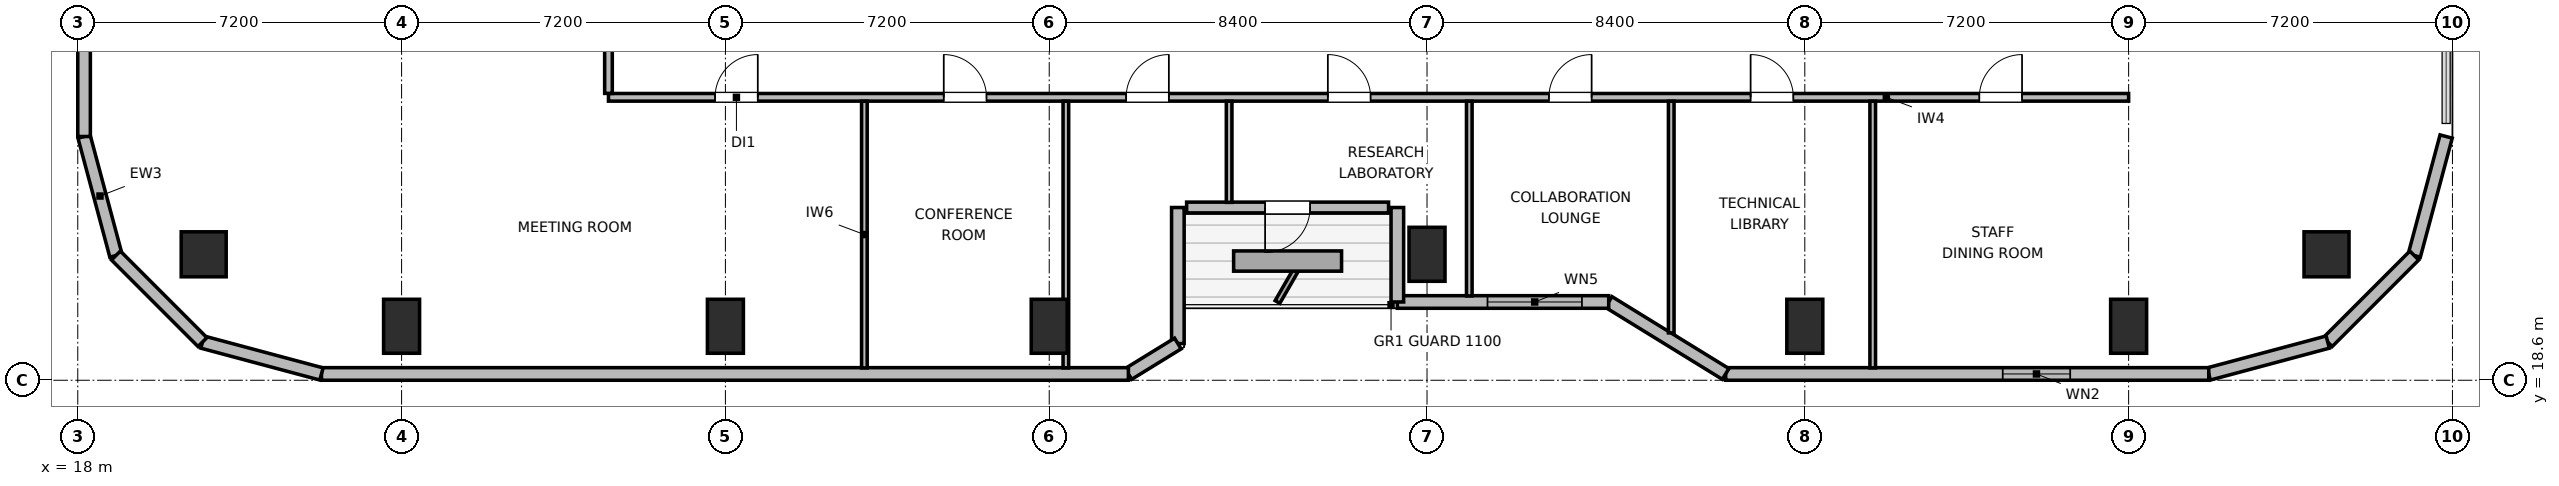
"""IFC4 building model, lengths in metres.
Left out: names, types, materials, properties, quantities, classifications, styles, units other than length and angle.
Written with IfcOpenShell. Run it as: python <this file> out.ifc"""

import sys

from ifc_helpers import new_model, si_unit, direction, frame, frame_2d, origin, origin_2d, place, context, subcontext, project, spatial, rectangle, circle, extrude, element, fill, save


model = new_model("IFC4")
c1 = context("Model", 3, precision=1e-05, world=origin(), true_north=direction((0.0, 1.0)))
c2 = subcontext(c1, "Body", "Model", "MODEL_VIEW")
j1 = project(units=[si_unit("LENGTHUNIT", "METRE"), si_unit("PLANEANGLEUNIT", "RADIAN")], contexts=[c1])
p1 = place(None, origin())
s1 = spatial("IfcSite", under=j1, at=p1, CompositionType="ELEMENT")
p2 = place(p1, origin())
s2 = spatial("IfcBuilding", under=s1, at=p2, CompositionType="ELEMENT")
p3 = place(p2, frame((0.0, 0.0, 170.1)))
s3 = spatial("IfcBuildingStorey", under=s2, at=p3, CompositionType="ELEMENT", Elevation=170.1)
for number, where, z_axis, x_axis in (
    (1, (20.8, 21.4, 0.0), (0.0, 0.0, 1.0), (1.0, 0.0, 0.0)),
    (2, (68.0, 21.4, 0.0), (0.0, 0.0, 1.0), (1.0, 0.0, 0.0)),
):
    element("IfcColumn", number, at=place(p3, frame(where, z_axis=z_axis, x_axis=x_axis)), inside=s3, PredefinedType="COLUMN", context=c2, shape_type="SweptSolid", body=[
        extrude(circle(Radius=0.5, at=origin_2d()), origin(), (0.0, 0.0, 1.0), 3.9),
    ])
for number, where, z_axis, x_axis in (
    (3, (25.2, 19.8, 0.0), (0.0, 0.0, 1.0), (1.0, 0.0, 0.0)),
    (4, (32.4, 19.8, 0.0), (0.0, 0.0, 1.0), (1.0, 0.0, 0.0)),
    (5, (39.6, 19.8, 0.0), (0.0, 0.0, 1.0), (1.0, 0.0, 0.0)),
    (6, (48.0, 21.4, 0.0), (0.0, 0.0, 1.0), (1.0, 0.0, 0.0)),
    (7, (56.4, 19.8, 0.0), (0.0, 0.0, 1.0), (1.0, 0.0, 0.0)),
    (8, (63.6, 19.8, 0.0), (0.0, 0.0, 1.0), (1.0, 0.0, 0.0)),
):
    element("IfcColumn", number, at=place(p3, frame(where, z_axis=z_axis, x_axis=x_axis)), inside=s3, PredefinedType="COLUMN", context=c2, shape_type="SweptSolid", body=[
        extrude(rectangle(XDim=0.8, YDim=1.2, at=origin_2d()), origin(), (0.0, 0.0, 1.0), 3.9),
    ])
p4 = place(p3, frame((18.848, 21.373, 0.0), z_axis=(0.0, 0.0, 1.0), x_axis=(-0.258672222976, 0.9659651552, 0.0)))
e9 = element("IfcWall", 9, at=p4, inside=s3, PredefinedType="SOLIDWALL", context=c2, shape_type="SweptSolid", body=[
    extrude(rectangle(XDim=2.739, YDim=0.28, at=frame_2d((1.37, 0.0))), origin(), (0.0, 0.0, 1.0), 3.68),
])
p5 = place(p3, frame((18.14, 24.018, 0.0), z_axis=(0.0, 0.0, 1.0), x_axis=(0.0, 1.0, 0.0)))
e10 = element("IfcWall", 10, at=p5, inside=s3, PredefinedType="SOLIDWALL", context=c2, shape_type="SweptSolid", body=[
    extrude(rectangle(XDim=5.242, YDim=0.28, at=frame_2d((2.621, 0.0))), origin(), (0.0, 0.0, 1.0), 3.68),
])
p6 = place(p3, frame((70.66, 24.018, 0.0), z_axis=(0.0, 0.0, 1.0), x_axis=(-0.258672222976, -0.9659651552, 0.0)))
e11 = element("IfcWall", 11, at=p6, inside=s3, PredefinedType="SOLIDWALL", context=c2, shape_type="SweptSolid", body=[
    extrude(rectangle(XDim=2.739, YDim=0.28, at=frame_2d((1.37, 0.0))), origin(), (0.0, 0.0, 1.0), 3.68),
])
p7 = place(p3, frame((69.951, 21.373, 0.0), z_axis=(0.0, 0.0, 1.0), x_axis=(-0.707061915429, -0.707151644098, 0.0)))
e12 = element("IfcWall", 12, at=p7, inside=s3, PredefinedType="SOLIDWALL", context=c2, shape_type="SweptSolid", body=[
    extrude(rectangle(XDim=2.721, YDim=0.28, at=frame_2d((1.36, 0.0))), origin(), (0.0, 0.0, 1.0), 3.68),
])
p8 = place(p3, frame((68.028, 19.448, 0.0), z_axis=(0.0, 0.0, 1.0), x_axis=(-0.965971118627, -0.258649952598, 0.0)))
e13 = element("IfcWall", 13, at=p8, inside=s3, PredefinedType="SOLIDWALL", context=c2, shape_type="SweptSolid", body=[
    extrude(rectangle(XDim=2.739, YDim=0.28, at=frame_2d((1.37, 0.0))), origin(), (0.0, 0.0, 1.0), 3.68),
])
p9 = place(p3, frame((65.382, 18.74, 0.0), z_axis=(0.0, 0.0, 1.0), x_axis=(-1.0, 0.0, 0.0)))
e14 = element("IfcWall", 14, at=p9, inside=s3, PredefinedType="SOLIDWALL", context=c2, shape_type="SweptSolid", body=[
    extrude(rectangle(XDim=10.742, YDim=0.28, at=frame_2d((5.371, 0.0))), origin(), (0.0, 0.0, 1.0), 3.68),
])
p10 = place(p9, frame((3.081, 0.0, 0.85)))
e15 = element("IfcOpeningElement", 15, at=p10, cuts=e14, PredefinedType="OPENING", context=c2, shape_type="SweptSolid", body=[
    extrude(rectangle(XDim=1.5, YDim=1.1, at=frame_2d((0.75, 0.55))), frame((0.0, 0.15, 0.0), z_axis=(0.0, -1.0, 0.0), x_axis=(1.0, 0.0, 0.0)), (0.0, 0.0, 1.0), 0.3),
])
p11 = place(p3, frame((54.64, 18.74, 0.0), z_axis=(0.0, 0.0, 1.0), x_axis=(-0.851652825334, 0.524106349037, 0.0)))
e16 = element("IfcWall", 16, at=p11, inside=s3, PredefinedType="SOLIDWALL", context=c2, shape_type="SweptSolid", body=[
    extrude(rectangle(XDim=3.053, YDim=0.28, at=frame_2d((1.526, 0.0))), origin(), (0.0, 0.0, 1.0), 2.265),
])
p12 = place(p3, frame((52.04, 20.34, 0.0), z_axis=(0.0, 0.0, 1.0), x_axis=(-1.0, 0.0, 0.0)))
e17 = element("IfcWall", 17, at=p12, inside=s3, PredefinedType="SOLIDWALL", context=c2, shape_type="SweptSolid", body=[
    extrude(rectangle(XDim=4.699, YDim=0.28, at=frame_2d((2.35, 0.0))), origin(), (0.0, 0.0, 1.0), 2.265),
])
p13 = place(p12, frame((0.595, 0.0, 0.85)))
e18 = element("IfcOpeningElement", 18, at=p13, cuts=e17, PredefinedType="OPENING", context=c2, shape_type="SweptSolid", body=[
    extrude(rectangle(XDim=2.1, YDim=1.05, at=frame_2d((1.05, 0.525))), frame((0.0, 0.15, 0.0), z_axis=(0.0, -1.0, 0.0), x_axis=(1.0, 0.0, 0.0)), (0.0, 0.0, 1.0), 0.3),
])
p14 = place(p3, frame((47.34, 20.34, 0.0), z_axis=(0.0, 0.0, 1.0), x_axis=(0.0, 1.0, 0.0)))
e19 = element("IfcWall", 19, at=p14, inside=s3, PredefinedType="SOLIDWALL", context=c2, shape_type="SweptSolid", body=[
    extrude(rectangle(XDim=2.1, YDim=0.28, at=frame_2d((1.05, 0.0))), origin(), (0.0, 0.0, 1.0), 2.265),
])
p15 = place(p3, frame((47.145, 22.44, 0.0), z_axis=(0.0, 0.0, 1.0), x_axis=(-1.0, 0.0, 0.0)))
e20 = element("IfcWall", 20, at=p15, inside=s3, PredefinedType="SOLIDWALL", context=c2, shape_type="SweptSolid", body=[
    extrude(rectangle(XDim=4.49, YDim=0.24, at=frame_2d((2.245, 0.0))), origin(), (0.0, 0.0, 1.0), 3.68),
])
p16 = place(p15, frame((1.745, 0.0, 0.0)))
e21 = element("IfcOpeningElement", 21, at=p16, cuts=e20, PredefinedType="OPENING", context=c2, shape_type="SweptSolid", body=[
    extrude(rectangle(XDim=1.0, YDim=2.02, at=frame_2d((0.5, 1.01))), frame((0.0, 0.13, 0.0), z_axis=(0.0, -1.0, 0.0), x_axis=(1.0, 0.0, 0.0)), (0.0, 0.0, 1.0), 0.26),
])
p17 = place(p3, frame((42.46, 22.44, 0.0), z_axis=(0.0, 0.0, 1.0), x_axis=(0.0, -1.0, 0.0)))
e22 = element("IfcWall", 22, at=p17, inside=s3, PredefinedType="SOLIDWALL", context=c2, shape_type="SweptSolid", body=[
    extrude(rectangle(XDim=3.024, YDim=0.28, at=frame_2d((1.512, 0.0))), origin(), (0.0, 0.0, 1.0), 2.265),
])
p18 = place(p3, frame((42.46, 19.416, 0.0), z_axis=(0.0, 0.0, 1.0), x_axis=(-0.851801140441, -0.523865266212, 0.0)))
e23 = element("IfcWall", 23, at=p18, inside=s3, PredefinedType="SOLIDWALL", context=c2, shape_type="SweptSolid", body=[
    extrude(rectangle(XDim=1.291, YDim=0.28, at=frame_2d((0.646, 0.0))), origin(), (0.0, 0.0, 1.0), 3.68),
])
p19 = place(p3, frame((41.36, 18.74, 0.0), z_axis=(0.0, 0.0, 1.0), x_axis=(-1.0, 0.0, 0.0)))
e24 = element("IfcWall", 24, at=p19, inside=s3, PredefinedType="SOLIDWALL", context=c2, shape_type="SweptSolid", body=[
    extrude(rectangle(XDim=17.942, YDim=0.28, at=frame_2d((8.971, 0.0))), origin(), (0.0, 0.0, 1.0), 3.68),
])
p20 = place(p3, frame((23.418, 18.74, 0.0), z_axis=(0.0, 0.0, 1.0), x_axis=(-0.965971118627, 0.258649952598, 0.0)))
e25 = element("IfcWall", 25, at=p20, inside=s3, PredefinedType="SOLIDWALL", context=c2, shape_type="SweptSolid", body=[
    extrude(rectangle(XDim=2.739, YDim=0.28, at=frame_2d((1.37, 0.0))), origin(), (0.0, 0.0, 1.0), 3.68),
])
p21 = place(p3, frame((20.772, 19.448, 0.0), z_axis=(0.0, 0.0, 1.0), x_axis=(-0.707106781187, 0.707106781187, 0.0)))
e26 = element("IfcWall", 26, at=p21, inside=s3, PredefinedType="SOLIDWALL", context=c2, shape_type="SweptSolid", body=[
    extrude(rectangle(XDim=2.721, YDim=0.28, at=frame_2d((1.36, 0.0))), origin(), (0.0, 0.0, 1.0), 3.68),
])
p22 = place(p3, frame((29.8, 24.89, 0.0), z_axis=(0.0, 0.0, 1.0), x_axis=(1.0, 0.0, 0.0)))
e27 = element("IfcWall", 27, at=p22, inside=s3, PredefinedType="PARTITIONING", context=c2, shape_type="SweptSolid", body=[
    extrude(rectangle(XDim=33.8, YDim=0.17, at=frame_2d((16.9, 0.0))), origin(), (0.0, 0.0, 1.0), 3.68),
])
p23 = place(p22, frame((2.37, 0.0, 0.0)))
e28 = element("IfcOpeningElement", 28, at=p23, cuts=e27, PredefinedType="OPENING", context=c2, shape_type="SweptSolid", body=[
    extrude(rectangle(XDim=0.95, YDim=2.04, at=frame_2d((0.475, 1.02))), frame((0.0, 0.095, 0.0), z_axis=(0.0, -1.0, 0.0), x_axis=(1.0, 0.0, 0.0)), (0.0, 0.0, 1.0), 0.19),
])
p24 = place(p22, frame((7.455, 0.0, 0.0)))
e29 = element("IfcOpeningElement", 29, at=p24, cuts=e27, PredefinedType="OPENING", context=c2, shape_type="SweptSolid", body=[
    extrude(rectangle(XDim=0.95, YDim=2.04, at=frame_2d((0.475, 1.02))), frame((0.0, 0.095, 0.0), z_axis=(0.0, -1.0, 0.0), x_axis=(1.0, 0.0, 0.0)), (0.0, 0.0, 1.0), 0.19),
])
p25 = place(p22, frame((11.51, 0.0, 0.0)))
e30 = element("IfcOpeningElement", 30, at=p25, cuts=e27, PredefinedType="OPENING", context=c2, shape_type="SweptSolid", body=[
    extrude(rectangle(XDim=0.95, YDim=2.04, at=frame_2d((0.475, 1.02))), frame((0.0, 0.095, 0.0), z_axis=(0.0, -1.0, 0.0), x_axis=(1.0, 0.0, 0.0)), (0.0, 0.0, 1.0), 0.19),
])
p26 = place(p22, frame((15.995, 0.0, 0.0)))
e31 = element("IfcOpeningElement", 31, at=p26, cuts=e27, PredefinedType="OPENING", context=c2, shape_type="SweptSolid", body=[
    extrude(rectangle(XDim=0.95, YDim=2.04, at=frame_2d((0.475, 1.02))), frame((0.0, 0.095, 0.0), z_axis=(0.0, -1.0, 0.0), x_axis=(1.0, 0.0, 0.0)), (0.0, 0.0, 1.0), 0.19),
])
p27 = place(p22, frame((20.91, 0.0, 0.0)))
e32 = element("IfcOpeningElement", 32, at=p27, cuts=e27, PredefinedType="OPENING", context=c2, shape_type="SweptSolid", body=[
    extrude(rectangle(XDim=0.95, YDim=2.04, at=frame_2d((0.475, 1.02))), frame((0.0, 0.095, 0.0), z_axis=(0.0, -1.0, 0.0), x_axis=(1.0, 0.0, 0.0)), (0.0, 0.0, 1.0), 0.19),
])
p28 = place(p22, frame((25.395, 0.0, 0.0)))
e33 = element("IfcOpeningElement", 33, at=p28, cuts=e27, PredefinedType="OPENING", context=c2, shape_type="SweptSolid", body=[
    extrude(rectangle(XDim=0.95, YDim=2.04, at=frame_2d((0.475, 1.02))), frame((0.0, 0.095, 0.0), z_axis=(0.0, -1.0, 0.0), x_axis=(1.0, 0.0, 0.0)), (0.0, 0.0, 1.0), 0.19),
])
p29 = place(p22, frame((30.48, 0.0, 0.0)))
e34 = element("IfcOpeningElement", 34, at=p29, cuts=e27, PredefinedType="OPENING", context=c2, shape_type="SweptSolid", body=[
    extrude(rectangle(XDim=0.95, YDim=2.04, at=frame_2d((0.475, 1.02))), frame((0.0, 0.095, 0.0), z_axis=(0.0, -1.0, 0.0), x_axis=(1.0, 0.0, 0.0)), (0.0, 0.0, 1.0), 0.19),
])
p30 = place(p3, frame((29.8, 24.977, 0.0), z_axis=(0.0, 0.0, 1.0), x_axis=(0.0, 1.0, 0.0)))
e35 = element("IfcWall", 35, at=p30, inside=s3, PredefinedType="PARTITIONING", context=c2, shape_type="SweptSolid", body=[
    extrude(rectangle(XDim=9.423, YDim=0.17, at=frame_2d((4.711, 0.0))), origin(), (0.0, 0.0, 1.0), 3.68),
])
p31 = place(p30, frame((4.193, 0.0, 0.0)))
e36 = element("IfcOpeningElement", 36, at=p31, cuts=e35, PredefinedType="OPENING", context=c2, shape_type="SweptSolid", body=[
    extrude(rectangle(XDim=0.95, YDim=2.04, at=frame_2d((0.475, 1.02))), frame((0.0, 0.095, 0.0), z_axis=(0.0, -1.0, 0.0), x_axis=(1.0, 0.0, 0.0)), (0.0, 0.0, 1.0), 0.19),
])
p32 = place(p3, frame((35.49, 18.875, 0.0), z_axis=(0.0, 0.0, 1.0), x_axis=(0.0, 1.0, 0.0)))
e37 = element("IfcWall", 37, at=p32, inside=s3, PredefinedType="PARTITIONING", context=c2, shape_type="SweptSolid", body=[
    extrude(rectangle(XDim=5.928, YDim=0.125, at=frame_2d((2.964, 0.0))), origin(), (0.0, 0.0, 1.0), 3.68),
])
p33 = place(p3, frame((39.97, 18.875, 0.0), z_axis=(0.0, 0.0, 1.0), x_axis=(0.0, 1.0, 0.0)))
e38 = element("IfcWall", 38, at=p33, inside=s3, PredefinedType="PARTITIONING", context=c2, shape_type="SweptSolid", body=[
    extrude(rectangle(XDim=5.928, YDim=0.125, at=frame_2d((2.964, 0.0))), origin(), (0.0, 0.0, 1.0), 3.043),
])
p34 = place(p3, frame((43.6, 22.555, 0.0), z_axis=(0.0, 0.0, 1.0), x_axis=(0.0, 1.0, 0.0)))
e39 = element("IfcWall", 39, at=p34, inside=s3, PredefinedType="PARTITIONING", context=c2, shape_type="SweptSolid", body=[
    extrude(rectangle(XDim=2.248, YDim=0.125, at=frame_2d((1.124, 0.0))), origin(), (0.0, 0.0, 1.0), 3.043),
])
p35 = place(p3, frame((48.94, 20.475, 0.0), z_axis=(0.0, 0.0, 1.0), x_axis=(0.0, 1.0, 0.0)))
e40 = element("IfcWall", 40, at=p35, inside=s3, PredefinedType="PARTITIONING", context=c2, shape_type="SweptSolid", body=[
    extrude(rectangle(XDim=4.328, YDim=0.125, at=frame_2d((2.164, 0.0))), origin(), (0.0, 0.0, 1.0), 3.68),
])
p36 = place(p3, frame((53.43, 19.653, 0.0), z_axis=(0.0, 0.0, 1.0), x_axis=(0.0, 1.0, 0.0)))
e41 = element("IfcWall", 41, at=p36, inside=s3, PredefinedType="PARTITIONING", context=c2, shape_type="SweptSolid", body=[
    extrude(rectangle(XDim=5.15, YDim=0.125, at=frame_2d((2.575, 0.0))), origin(), (0.0, 0.0, 1.0), 3.043),
])
p37 = place(p3, frame((57.91, 18.875, 0.0), z_axis=(0.0, 0.0, 1.0), x_axis=(0.0, 1.0, 0.0)))
e42 = element("IfcWall", 42, at=p37, inside=s3, PredefinedType="PARTITIONING", context=c2, shape_type="SweptSolid", body=[
    extrude(rectangle(XDim=5.928, YDim=0.125, at=frame_2d((2.964, 0.0))), origin(), (0.0, 0.0, 1.0), 3.68),
])
p38 = place(p10, origin())
e43 = element("IfcWindow", 43, at=p38, inside=s3, PartitioningType="SINGLE_PANEL", PredefinedType="WINDOW", context=c2, shape_type="SweptSolid", body=[
    extrude(rectangle(XDim=1.5, YDim=1.1, at=frame_2d((0.75, 0.55))), frame((0.0, 0.03, 0.0), z_axis=(0.0, -1.0, 0.0), x_axis=(1.0, 0.0, 0.0)), (0.0, 0.0, 1.0), 0.06),
])
fill(e15, e43)
p39 = place(p13, origin())
e44 = element("IfcWindow", 44, at=p39, inside=s3, PartitioningType="SINGLE_PANEL", PredefinedType="WINDOW", context=c2, shape_type="SweptSolid", body=[
    extrude(rectangle(XDim=2.1, YDim=1.05, at=frame_2d((1.05, 0.525))), frame((0.0, 0.03, 0.0), z_axis=(0.0, -1.0, 0.0), x_axis=(1.0, 0.0, 0.0)), (0.0, 0.0, 1.0), 0.06),
])
fill(e18, e44)
p40 = place(p16, origin())
e45 = element("IfcDoor", 45, at=p40, inside=s3, OperationType="SINGLE_SWING_RIGHT", PredefinedType="DOOR", context=c2, shape_type="SweptSolid", body=[
    extrude(rectangle(XDim=1.0, YDim=2.02, at=frame_2d((0.5, 1.01))), frame((0.0, 0.025, 0.0), z_axis=(0.0, -1.0, 0.0), x_axis=(1.0, 0.0, 0.0)), (0.0, 0.0, 1.0), 0.05),
])
fill(e21, e45)
p41 = place(p23, origin())
e46 = element("IfcDoor", 46, at=p41, inside=s3, OperationType="SINGLE_SWING_RIGHT", PredefinedType="DOOR", context=c2, shape_type="SweptSolid", body=[
    extrude(rectangle(XDim=0.95, YDim=2.04, at=frame_2d((0.475, 1.02))), frame((0.0, 0.025, 0.0), z_axis=(0.0, -1.0, 0.0), x_axis=(1.0, 0.0, 0.0)), (0.0, 0.0, 1.0), 0.05),
])
fill(e28, e46)
p42 = place(p24, origin())
e47 = element("IfcDoor", 47, at=p42, inside=s3, OperationType="SINGLE_SWING_LEFT", PredefinedType="DOOR", context=c2, shape_type="SweptSolid", body=[
    extrude(rectangle(XDim=0.95, YDim=2.04, at=frame_2d((0.475, 1.02))), frame((0.0, 0.025, 0.0), z_axis=(0.0, -1.0, 0.0), x_axis=(1.0, 0.0, 0.0)), (0.0, 0.0, 1.0), 0.05),
])
fill(e29, e47)
p43 = place(p25, origin())
e48 = element("IfcDoor", 48, at=p43, inside=s3, OperationType="SINGLE_SWING_RIGHT", PredefinedType="DOOR", context=c2, shape_type="SweptSolid", body=[
    extrude(rectangle(XDim=0.95, YDim=2.04, at=frame_2d((0.475, 1.02))), frame((0.0, 0.025, 0.0), z_axis=(0.0, -1.0, 0.0), x_axis=(1.0, 0.0, 0.0)), (0.0, 0.0, 1.0), 0.05),
])
fill(e30, e48)
p44 = place(p26, origin())
e49 = element("IfcDoor", 49, at=p44, inside=s3, OperationType="SINGLE_SWING_LEFT", PredefinedType="DOOR", context=c2, shape_type="SweptSolid", body=[
    extrude(rectangle(XDim=0.95, YDim=2.04, at=frame_2d((0.475, 1.02))), frame((0.0, 0.025, 0.0), z_axis=(0.0, -1.0, 0.0), x_axis=(1.0, 0.0, 0.0)), (0.0, 0.0, 1.0), 0.05),
])
fill(e31, e49)
p45 = place(p27, origin())
e50 = element("IfcDoor", 50, at=p45, inside=s3, OperationType="SINGLE_SWING_RIGHT", PredefinedType="DOOR", context=c2, shape_type="SweptSolid", body=[
    extrude(rectangle(XDim=0.95, YDim=2.04, at=frame_2d((0.475, 1.02))), frame((0.0, 0.025, 0.0), z_axis=(0.0, -1.0, 0.0), x_axis=(1.0, 0.0, 0.0)), (0.0, 0.0, 1.0), 0.05),
])
fill(e32, e50)
p46 = place(p28, origin())
e51 = element("IfcDoor", 51, at=p46, inside=s3, OperationType="SINGLE_SWING_LEFT", PredefinedType="DOOR", context=c2, shape_type="SweptSolid", body=[
    extrude(rectangle(XDim=0.95, YDim=2.04, at=frame_2d((0.475, 1.02))), frame((0.0, 0.025, 0.0), z_axis=(0.0, -1.0, 0.0), x_axis=(1.0, 0.0, 0.0)), (0.0, 0.0, 1.0), 0.05),
])
fill(e33, e51)
p47 = place(p29, origin())
e52 = element("IfcDoor", 52, at=p47, inside=s3, OperationType="SINGLE_SWING_RIGHT", PredefinedType="DOOR", context=c2, shape_type="SweptSolid", body=[
    extrude(rectangle(XDim=0.95, YDim=2.04, at=frame_2d((0.475, 1.02))), frame((0.0, 0.025, 0.0), z_axis=(0.0, -1.0, 0.0), x_axis=(1.0, 0.0, 0.0)), (0.0, 0.0, 1.0), 0.05),
])
fill(e34, e52)
save(model, sys.argv[1])
